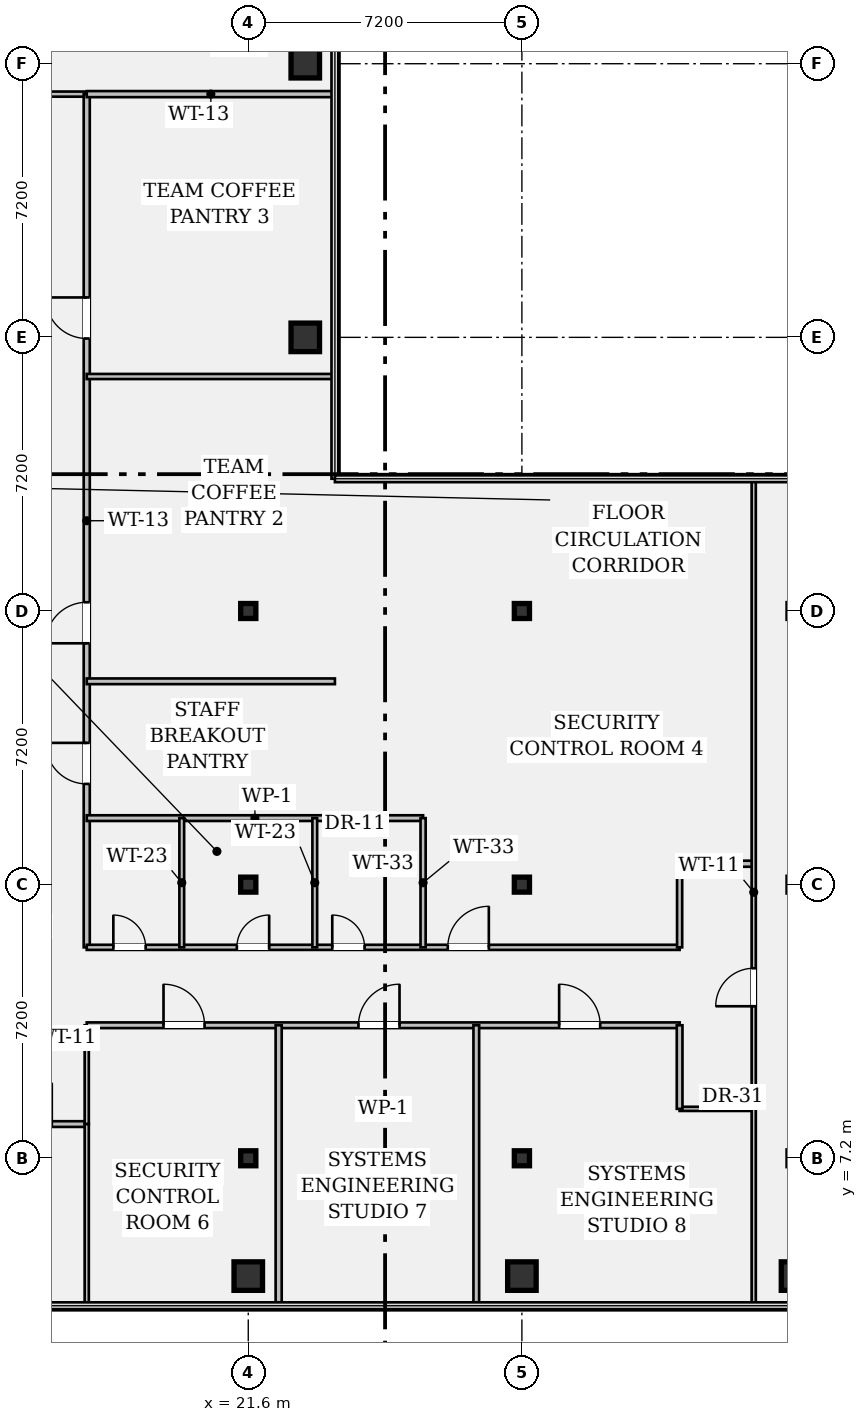
"""IFC4 building model, lengths in metres.
Left out: names, types, materials, properties, quantities, classifications, styles, units other than length and angle.
Written with IfcOpenShell. Run it as: python <this file> out.ifc"""

import sys

from ifc_helpers import new_model, si_unit, direction, frame, frame_2d, origin, origin_2d, place, context, subcontext, project, spatial, rectangle, hollow_rectangle, i_section, extrude, element, fill, save


model = new_model("IFC4")
c1 = context("Model", 3, precision=1e-05, world=origin(), true_north=direction((0.0, 1.0)))
c2 = subcontext(c1, "Body", "Model", "MODEL_VIEW")
j1 = project(units=[si_unit("LENGTHUNIT", "METRE"), si_unit("PLANEANGLEUNIT", "RADIAN")], contexts=[c1])
p1 = place(None, origin())
s1 = spatial("IfcSite", under=j1, at=p1, CompositionType="ELEMENT")
p2 = place(p1, origin())
s2 = spatial("IfcBuilding", under=s1, at=p2, CompositionType="ELEMENT")
p3 = place(p2, frame((0.0, 0.0, 222.25)))
s3 = spatial("IfcBuildingStorey", under=s2, at=p3, CompositionType="ELEMENT", Elevation=222.25)
p4 = place(p3, frame((21.6, 4.1, 0.0), z_axis=(0.0, 0.0, 1.0), x_axis=(1.0, 0.0, 0.0)))
e1 = element("IfcColumn", 1, at=p4, inside=s3, PredefinedType="COLUMN", context=c2, shape_type="SweptSolid", body=[
    extrude(hollow_rectangle(XDim=0.75, YDim=0.75, WallThickness=0.045, at=origin_2d()), origin(), (0.0, 0.0, 1.0), 3.24),
])
for number, where, z_axis, x_axis in (
    (2, (21.6, 7.2, 0.0), (0.0, 0.0, 1.0), (1.0, 0.0, 0.0)),
    (3, (21.6, 14.4, 0.0), (0.0, 0.0, 1.0), (1.0, 0.0, 0.0)),
    (4, (21.6, 21.6, 0.0), (0.0, 0.0, 1.0), (1.0, 0.0, 0.0)),
):
    element("IfcColumn", number, at=place(p3, frame(where, z_axis=z_axis, x_axis=x_axis)), inside=s3, PredefinedType="COLUMN", context=c2, shape_type="SweptSolid", body=[
        extrude(i_section(OverallWidth=0.399, OverallDepth=0.394, WebThickness=0.023, FlangeThickness=0.037, FilletRadius=0.018, at=origin_2d()), origin(), (0.0, 0.0, 1.0), 3.24),
    ])
for number, where, z_axis, x_axis in (
    (5, (23.1, 28.8, 0.0), (0.0, 0.0, 1.0), (1.0, 0.0, 0.0)),
    (6, (23.1, 36.0, 0.0), (0.0, 0.0, 1.0), (1.0, 0.0, 0.0)),
    (7, (28.8, 4.1, 0.0), (0.0, 0.0, 1.0), (1.0, 0.0, 0.0)),
):
    element("IfcColumn", number, at=place(p3, frame(where, z_axis=z_axis, x_axis=x_axis)), inside=s3, PredefinedType="COLUMN", context=c2, shape_type="SweptSolid", body=[
        extrude(hollow_rectangle(XDim=0.75, YDim=0.75, WallThickness=0.045, at=origin_2d()), origin(), (0.0, 0.0, 1.0), 3.24),
    ])
for number, where, z_axis, x_axis in (
    (8, (28.8, 7.2, 0.0), (0.0, 0.0, 1.0), (1.0, 0.0, 0.0)),
    (9, (28.8, 14.4, 0.0), (0.0, 0.0, 1.0), (1.0, 0.0, 0.0)),
    (10, (28.8, 21.6, 0.0), (0.0, 0.0, 1.0), (1.0, 0.0, 0.0)),
):
    element("IfcColumn", number, at=place(p3, frame(where, z_axis=z_axis, x_axis=x_axis)), inside=s3, PredefinedType="COLUMN", context=c2, shape_type="SweptSolid", body=[
        extrude(i_section(OverallWidth=0.399, OverallDepth=0.394, WebThickness=0.023, FlangeThickness=0.037, FilletRadius=0.018, at=origin_2d()), origin(), (0.0, 0.0, 1.0), 3.24),
    ])
p5 = place(p3, frame((36.0, 4.1, 0.0), z_axis=(0.0, 0.0, 1.0), x_axis=(1.0, 0.0, 0.0)))
e11 = element("IfcColumn", 11, at=p5, inside=s3, PredefinedType="COLUMN", context=c2, shape_type="SweptSolid", body=[
    extrude(hollow_rectangle(XDim=0.75, YDim=0.75, WallThickness=0.045, at=origin_2d()), origin(), (0.0, 0.0, 1.0), 3.24),
])
p6 = place(p3, frame((14.4, 8.1, 0.0), z_axis=(0.0, 0.0, 1.0), x_axis=(1.0, 0.0, 0.0)))
e12 = element("IfcWall", 12, at=p6, inside=s3, PredefinedType="PARTITIONING", context=c2, shape_type="SweptSolid", body=[
    extrude(rectangle(XDim=2.95, YDim=0.15, at=frame_2d((1.475, 0.0))), origin(), (0.0, 0.0, 1.0), 2.808),
])
p7 = place(p6, frame((0.95, 0.0, 0.0)))
e13 = element("IfcOpeningElement", 13, at=p7, cuts=e12, PredefinedType="OPENING", context=c2, shape_type="SweptSolid", body=[
    extrude(rectangle(XDim=1.08, YDim=2.15, at=frame_2d((0.54, 1.075))), frame((0.0, 0.087, 0.0), z_axis=(0.0, -1.0, 0.0), x_axis=(1.0, 0.0, 0.0)), (0.0, 0.0, 1.0), 0.174),
])
p8 = place(p3, frame((14.4, 35.2, 0.0), z_axis=(0.0, 0.0, 1.0), x_axis=(1.0, 0.0, 0.0)))
e14 = element("IfcWall", 14, at=p8, inside=s3, PredefinedType="PARTITIONING", context=c2, shape_type="SweptSolid", body=[
    extrude(rectangle(XDim=2.95, YDim=0.135, at=frame_2d((1.475, 0.0))), origin(), (0.0, 0.0, 1.0), 2.808),
])
p9 = place(p8, frame((0.95, 0.0, 0.0)))
e15 = element("IfcOpeningElement", 15, at=p9, cuts=e14, PredefinedType="OPENING", context=c2, shape_type="SweptSolid", body=[
    extrude(rectangle(XDim=1.0, YDim=2.15, at=frame_2d((0.5, 1.075))), frame((0.0, 0.08, 0.0), z_axis=(0.0, -1.0, 0.0), x_axis=(1.0, 0.0, 0.0)), (0.0, 0.0, 1.0), 0.159),
])
p10 = place(p3, frame((17.35, 8.1, 0.0), z_axis=(0.0, 0.0, 1.0), x_axis=(0.0, 1.0, 0.0)))
e16 = element("IfcWall", 16, at=p10, inside=s3, PredefinedType="PARTITIONING", context=c2, shape_type="SweptSolid", body=[
    extrude(rectangle(XDim=2.6, YDim=0.11, at=frame_2d((1.3, 0.0))), origin(), (0.0, 0.0, 1.0), 3.24),
])
p11 = place(p3, frame((17.35, 12.75, 0.0), z_axis=(0.0, 0.0, 1.0), x_axis=(0.0, 1.0, 0.0)))
e17 = element("IfcWall", 17, at=p11, inside=s3, PredefinedType="PARTITIONING", context=c2, shape_type="SweptSolid", body=[
    extrude(rectangle(XDim=22.45, YDim=0.16, at=frame_2d((11.225, 0.0))), origin(), (0.0, 0.0, 1.0), 2.613),
])
p12 = place(p11, frame((4.3, 0.0, 0.0)))
e18 = element("IfcOpeningElement", 18, at=p12, cuts=e17, PredefinedType="OPENING", context=c2, shape_type="SweptSolid", body=[
    extrude(rectangle(XDim=1.08, YDim=2.15, at=frame_2d((0.54, 1.075))), frame((0.0, 0.092, 0.0), z_axis=(0.0, -1.0, 0.0), x_axis=(1.0, 0.0, 0.0)), (0.0, 0.0, 1.0), 0.184),
])
p13 = place(p11, frame((8.0, 0.0, 0.0)))
e19 = element("IfcOpeningElement", 19, at=p13, cuts=e17, PredefinedType="OPENING", context=c2, shape_type="SweptSolid", body=[
    extrude(rectangle(XDim=1.08, YDim=2.15, at=frame_2d((0.54, 1.075))), frame((0.0, 0.092, 0.0), z_axis=(0.0, -1.0, 0.0), x_axis=(1.0, 0.0, 0.0)), (0.0, 0.0, 1.0), 0.184),
])
p14 = place(p11, frame((16.02, 0.0, 0.0)))
e20 = element("IfcOpeningElement", 20, at=p14, cuts=e17, PredefinedType="OPENING", context=c2, shape_type="SweptSolid", body=[
    extrude(rectangle(XDim=1.08, YDim=2.15, at=frame_2d((0.54, 1.075))), frame((0.0, 0.092, 0.0), z_axis=(0.0, -1.0, 0.0), x_axis=(1.0, 0.0, 0.0)), (0.0, 0.0, 1.0), 0.184),
])
p15 = place(p3, frame((17.35, 10.7, 0.0), z_axis=(0.0, 0.0, 1.0), x_axis=(1.0, 0.0, 0.0)))
e21 = element("IfcWall", 21, at=p15, inside=s3, PredefinedType="PARTITIONING", context=c2, shape_type="SweptSolid", body=[
    extrude(rectangle(XDim=15.6, YDim=0.15, at=frame_2d((7.8, 0.0))), origin(), (0.0, 0.0, 1.0), 2.613),
])
p16 = place(p15, frame((2.02, 0.0, 0.0)))
e22 = element("IfcOpeningElement", 22, at=p16, cuts=e21, PredefinedType="OPENING", context=c2, shape_type="SweptSolid", body=[
    extrude(rectangle(XDim=1.08, YDim=2.15, at=frame_2d((0.54, 1.075))), frame((0.0, 0.087, 0.0), z_axis=(0.0, -1.0, 0.0), x_axis=(1.0, 0.0, 0.0)), (0.0, 0.0, 1.0), 0.174),
])
p17 = place(p15, frame((7.15, 0.0, 0.0)))
e23 = element("IfcOpeningElement", 23, at=p17, cuts=e21, PredefinedType="OPENING", context=c2, shape_type="SweptSolid", body=[
    extrude(rectangle(XDim=1.08, YDim=2.15, at=frame_2d((0.54, 1.075))), frame((0.0, 0.087, 0.0), z_axis=(0.0, -1.0, 0.0), x_axis=(1.0, 0.0, 0.0)), (0.0, 0.0, 1.0), 0.174),
])
p18 = place(p15, frame((12.43, 0.0, 0.0)))
e24 = element("IfcOpeningElement", 24, at=p18, cuts=e21, PredefinedType="OPENING", context=c2, shape_type="SweptSolid", body=[
    extrude(rectangle(XDim=1.08, YDim=2.15, at=frame_2d((0.54, 1.075))), frame((0.0, 0.087, 0.0), z_axis=(0.0, -1.0, 0.0), x_axis=(1.0, 0.0, 0.0)), (0.0, 0.0, 1.0), 0.174),
])
p19 = place(p3, frame((17.35, 12.75, 0.0), z_axis=(0.0, 0.0, 1.0), x_axis=(1.0, 0.0, 0.0)))
e25 = element("IfcWall", 25, at=p19, inside=s3, PredefinedType="PARTITIONING", context=c2, shape_type="SweptSolid", body=[
    extrude(rectangle(XDim=15.6, YDim=0.135, at=frame_2d((7.8, 0.0))), origin(), (0.0, 0.0, 1.0), 2.613),
])
p20 = place(p19, frame((0.7, 0.0, 0.0)))
e26 = element("IfcOpeningElement", 26, at=p20, cuts=e25, PredefinedType="OPENING", context=c2, shape_type="SweptSolid", body=[
    extrude(rectangle(XDim=0.85, YDim=2.15, at=frame_2d((0.425, 1.075))), frame((0.0, 0.08, 0.0), z_axis=(0.0, -1.0, 0.0), x_axis=(1.0, 0.0, 0.0)), (0.0, 0.0, 1.0), 0.159),
])
p21 = place(p19, frame((3.95, 0.0, 0.0)))
e27 = element("IfcOpeningElement", 27, at=p21, cuts=e25, PredefinedType="OPENING", context=c2, shape_type="SweptSolid", body=[
    extrude(rectangle(XDim=0.85, YDim=2.15, at=frame_2d((0.425, 1.075))), frame((0.0, 0.08, 0.0), z_axis=(0.0, -1.0, 0.0), x_axis=(1.0, 0.0, 0.0)), (0.0, 0.0, 1.0), 0.159),
])
p22 = place(p19, frame((6.46, 0.0, 0.0)))
e28 = element("IfcOpeningElement", 28, at=p22, cuts=e25, PredefinedType="OPENING", context=c2, shape_type="SweptSolid", body=[
    extrude(rectangle(XDim=0.85, YDim=2.15, at=frame_2d((0.425, 1.075))), frame((0.0, 0.08, 0.0), z_axis=(0.0, -1.0, 0.0), x_axis=(1.0, 0.0, 0.0)), (0.0, 0.0, 1.0), 0.159),
])
p23 = place(p19, frame((9.5, 0.0, 0.0)))
e29 = element("IfcOpeningElement", 29, at=p23, cuts=e25, PredefinedType="OPENING", context=c2, shape_type="SweptSolid", body=[
    extrude(rectangle(XDim=1.08, YDim=2.15, at=frame_2d((0.54, 1.075))), frame((0.0, 0.08, 0.0), z_axis=(0.0, -1.0, 0.0), x_axis=(1.0, 0.0, 0.0)), (0.0, 0.0, 1.0), 0.159),
])
p24 = place(p3, frame((32.95, 8.5, 0.0), z_axis=(0.0, 0.0, 1.0), x_axis=(1.0, 0.0, 0.0)))
e30 = element("IfcWall", 30, at=p24, inside=s3, PredefinedType="PARTITIONING", context=c2, shape_type="SweptSolid", body=[
    extrude(rectangle(XDim=1.95, YDim=0.11, at=frame_2d((0.975, 0.0))), origin(), (0.0, 0.0, 1.0), 2.808),
])
p25 = place(p3, frame((32.95, 14.95, 0.0), z_axis=(0.0, 0.0, 1.0), x_axis=(1.0, 0.0, 0.0)))
e31 = element("IfcWall", 31, at=p25, inside=s3, PredefinedType="PARTITIONING", context=c2, shape_type="SweptSolid", body=[
    extrude(rectangle(XDim=1.95, YDim=0.16, at=frame_2d((0.975, 0.0))), origin(), (0.0, 0.0, 1.0), 2.808),
])
p26 = place(p3, frame((32.95, 8.5, 0.0), z_axis=(0.0, 0.0, 1.0), x_axis=(0.0, 1.0, 0.0)))
e32 = element("IfcWall", 32, at=p26, inside=s3, PredefinedType="PARTITIONING", context=c2, shape_type="SweptSolid", body=[
    extrude(rectangle(XDim=2.2, YDim=0.15, at=frame_2d((1.1, 0.0))), origin(), (0.0, 0.0, 1.0), 3.24),
])
p27 = place(p3, frame((32.95, 12.75, 0.0), z_axis=(0.0, 0.0, 1.0), x_axis=(0.0, 1.0, 0.0)))
e33 = element("IfcWall", 33, at=p27, inside=s3, PredefinedType="PARTITIONING", context=c2, shape_type="SweptSolid", body=[
    extrude(rectangle(XDim=2.2, YDim=0.135, at=frame_2d((1.1, 0.0))), origin(), (0.0, 0.0, 1.0), 2.613),
])
p28 = place(p3, frame((34.9, 3.32, 0.0), z_axis=(0.0, 0.0, 1.0), x_axis=(0.0, 1.0, 0.0)))
e34 = element("IfcWall", 34, at=p28, inside=s3, PredefinedType="PARTITIONING", context=c2, shape_type="SweptSolid", body=[
    extrude(rectangle(XDim=21.76, YDim=0.11, at=frame_2d((10.88, 0.0))), origin(), (0.0, 0.0, 1.0), 2.613),
])
p29 = place(p28, frame((7.88, 0.0, 0.0)))
e35 = element("IfcOpeningElement", 35, at=p29, cuts=e34, PredefinedType="OPENING", context=c2, shape_type="SweptSolid", body=[
    extrude(rectangle(XDim=1.0, YDim=2.15, at=frame_2d((0.5, 1.075))), frame((0.0, 0.067, 0.0), z_axis=(0.0, -1.0, 0.0), x_axis=(1.0, 0.0, 0.0)), (0.0, 0.0, 1.0), 0.134),
])
p30 = place(p3, frame((17.35, 35.2, 0.0), z_axis=(0.0, 0.0, 1.0), x_axis=(1.0, 0.0, 0.0)))
e36 = element("IfcWall", 36, at=p30, inside=s3, PredefinedType="PARTITIONING", context=c2, shape_type="SweptSolid", body=[
    extrude(rectangle(XDim=6.53, YDim=0.16, at=frame_2d((3.265, 0.0))), origin(), (0.0, 0.0, 1.0), 2.808),
])
p31 = place(p3, frame((17.35, 16.15, 0.0), z_axis=(0.0, 0.0, 1.0), x_axis=(1.0, 0.0, 0.0)))
e37 = element("IfcWall", 37, at=p31, inside=s3, PredefinedType="PARTITIONING", context=c2, shape_type="SweptSolid", body=[
    extrude(rectangle(XDim=8.85, YDim=0.15, at=frame_2d((4.425, 0.0))), origin(), (0.0, 0.0, 1.0), 2.613),
])
p32 = place(p3, frame((26.2, 12.75, 0.0), z_axis=(0.0, 0.0, 1.0), x_axis=(0.0, 1.0, 0.0)))
e38 = element("IfcWall", 38, at=p32, inside=s3, PredefinedType="PARTITIONING", context=c2, shape_type="SweptSolid", body=[
    extrude(rectangle(XDim=3.4, YDim=0.135, at=frame_2d((1.7, 0.0))), origin(), (0.0, 0.0, 1.0), 2.613),
])
for number, where, z_axis, x_axis in (
    (39, (19.85, 12.75, 0.0), (0.0, 0.0, 1.0), (0.0, 1.0, 0.0)),
    (40, (23.35, 12.75, 0.0), (0.0, 0.0, 1.0), (0.0, 1.0, 0.0)),
):
    element("IfcWall", number, at=place(p3, frame(where, z_axis=z_axis, x_axis=x_axis)), inside=s3, PredefinedType="PARTITIONING", context=c2, shape_type="SweptSolid", body=[
        extrude(rectangle(XDim=3.4, YDim=0.125, at=frame_2d((1.7, 0.0))), origin(), (0.0, 0.0, 1.0), 2.613),
    ])
p33 = place(p3, frame((17.35, 19.75, 0.0), z_axis=(0.0, 0.0, 1.0), x_axis=(1.0, 0.0, 0.0)))
e41 = element("IfcWall", 41, at=p33, inside=s3, PredefinedType="PARTITIONING", context=c2, shape_type="SweptSolid", body=[
    extrude(rectangle(XDim=6.53, YDim=0.15, at=frame_2d((3.265, 0.0))), origin(), (0.0, 0.0, 1.0), 2.613),
])
p34 = place(p3, frame((17.35, 27.77, 0.0), z_axis=(0.0, 0.0, 1.0), x_axis=(1.0, 0.0, 0.0)))
e42 = element("IfcWall", 42, at=p34, inside=s3, PredefinedType="PARTITIONING", context=c2, shape_type="SweptSolid", body=[
    extrude(rectangle(XDim=6.53, YDim=0.135, at=frame_2d((3.265, 0.0))), origin(), (0.0, 0.0, 1.0), 2.808),
])
p35 = place(p3, frame((17.35, 3.32, 0.0), z_axis=(0.0, 0.0, 1.0), x_axis=(0.0, 1.0, 0.0)))
e43 = element("IfcWall", 43, at=p35, inside=s3, PredefinedType="PARTITIONING", context=c2, shape_type="SweptSolid", body=[
    extrude(rectangle(XDim=4.78, YDim=0.11, at=frame_2d((2.39, 0.0))), origin(), (0.0, 0.0, 1.0), 2.613),
])
p36 = place(p3, frame((22.4, 3.32, 0.0), z_axis=(0.0, 0.0, 1.0), x_axis=(0.0, 1.0, 0.0)))
e44 = element("IfcWall", 44, at=p36, inside=s3, PredefinedType="PARTITIONING", context=c2, shape_type="SweptSolid", body=[
    extrude(rectangle(XDim=7.38, YDim=0.16, at=frame_2d((3.69, 0.0))), origin(), (0.0, 0.0, 1.0), 2.613),
])
p37 = place(p3, frame((27.6, 3.32, 0.0), z_axis=(0.0, 0.0, 1.0), x_axis=(0.0, 1.0, 0.0)))
e45 = element("IfcWall", 45, at=p37, inside=s3, PredefinedType="PARTITIONING", context=c2, shape_type="SweptSolid", body=[
    extrude(rectangle(XDim=7.38, YDim=0.15, at=frame_2d((3.69, 0.0))), origin(), (0.0, 0.0, 1.0), 2.613),
])
p38 = place(p20, origin())
e46 = element("IfcDoor", 46, at=p38, inside=s3, OperationType="SINGLE_SWING_LEFT", PredefinedType="DOOR", context=c2, shape_type="SweptSolid", body=[
    extrude(rectangle(XDim=0.85, YDim=2.15, at=frame_2d((0.425, 1.075))), frame((0.0, 0.025, 0.0), z_axis=(0.0, -1.0, 0.0), x_axis=(1.0, 0.0, 0.0)), (0.0, 0.0, 1.0), 0.05),
])
fill(e26, e46)
p39 = place(p21, origin())
e47 = element("IfcDoor", 47, at=p39, inside=s3, OperationType="SINGLE_SWING_RIGHT", PredefinedType="DOOR", context=c2, shape_type="SweptSolid", body=[
    extrude(rectangle(XDim=0.85, YDim=2.15, at=frame_2d((0.425, 1.075))), frame((0.0, 0.025, 0.0), z_axis=(0.0, -1.0, 0.0), x_axis=(1.0, 0.0, 0.0)), (0.0, 0.0, 1.0), 0.05),
])
fill(e27, e47)
p40 = place(p22, origin())
e48 = element("IfcDoor", 48, at=p40, inside=s3, OperationType="SINGLE_SWING_LEFT", PredefinedType="DOOR", context=c2, shape_type="SweptSolid", body=[
    extrude(rectangle(XDim=0.85, YDim=2.15, at=frame_2d((0.425, 1.075))), frame((0.0, 0.025, 0.0), z_axis=(0.0, -1.0, 0.0), x_axis=(1.0, 0.0, 0.0)), (0.0, 0.0, 1.0), 0.05),
])
fill(e28, e48)
p41 = place(p12, origin())
e49 = element("IfcDoor", 49, at=p41, inside=s3, OperationType="SINGLE_SWING_RIGHT", PredefinedType="DOOR", context=c2, shape_type="SweptSolid", body=[
    extrude(rectangle(XDim=1.08, YDim=2.15, at=frame_2d((0.54, 1.075))), frame((0.0, 0.025, 0.0), z_axis=(0.0, -1.0, 0.0), x_axis=(1.0, 0.0, 0.0)), (0.0, 0.0, 1.0), 0.05),
])
fill(e18, e49)
p42 = place(p13, origin())
e50 = element("IfcDoor", 50, at=p42, inside=s3, OperationType="SINGLE_SWING_LEFT", PredefinedType="DOOR", context=c2, shape_type="SweptSolid", body=[
    extrude(rectangle(XDim=1.08, YDim=2.15, at=frame_2d((0.54, 1.075))), frame((0.0, 0.025, 0.0), z_axis=(0.0, -1.0, 0.0), x_axis=(1.0, 0.0, 0.0)), (0.0, 0.0, 1.0), 0.05),
])
fill(e19, e50)
p43 = place(p14, origin())
e51 = element("IfcDoor", 51, at=p43, inside=s3, OperationType="SINGLE_SWING_RIGHT", PredefinedType="DOOR", context=c2, shape_type="SweptSolid", body=[
    extrude(rectangle(XDim=1.08, YDim=2.15, at=frame_2d((0.54, 1.075))), frame((0.0, 0.025, 0.0), z_axis=(0.0, -1.0, 0.0), x_axis=(1.0, 0.0, 0.0)), (0.0, 0.0, 1.0), 0.05),
])
fill(e20, e51)
p44 = place(p23, origin())
e52 = element("IfcDoor", 52, at=p44, inside=s3, OperationType="SINGLE_SWING_RIGHT", PredefinedType="DOOR", context=c2, shape_type="SweptSolid", body=[
    extrude(rectangle(XDim=1.08, YDim=2.15, at=frame_2d((0.54, 1.075))), frame((0.0, 0.025, 0.0), z_axis=(0.0, -1.0, 0.0), x_axis=(1.0, 0.0, 0.0)), (0.0, 0.0, 1.0), 0.05),
])
fill(e29, e52)
p45 = place(p16, origin())
e53 = element("IfcDoor", 53, at=p45, inside=s3, OperationType="SINGLE_SWING_LEFT", PredefinedType="DOOR", context=c2, shape_type="SweptSolid", body=[
    extrude(rectangle(XDim=1.08, YDim=2.15, at=frame_2d((0.54, 1.075))), frame((0.0, 0.025, 0.0), z_axis=(0.0, -1.0, 0.0), x_axis=(1.0, 0.0, 0.0)), (0.0, 0.0, 1.0), 0.05),
])
fill(e22, e53)
p46 = place(p17, origin())
e54 = element("IfcDoor", 54, at=p46, inside=s3, OperationType="SINGLE_SWING_RIGHT", PredefinedType="DOOR", context=c2, shape_type="SweptSolid", body=[
    extrude(rectangle(XDim=1.08, YDim=2.15, at=frame_2d((0.54, 1.075))), frame((0.0, 0.025, 0.0), z_axis=(0.0, -1.0, 0.0), x_axis=(1.0, 0.0, 0.0)), (0.0, 0.0, 1.0), 0.05),
])
fill(e23, e54)
p47 = place(p18, origin())
e55 = element("IfcDoor", 55, at=p47, inside=s3, OperationType="SINGLE_SWING_LEFT", PredefinedType="DOOR", context=c2, shape_type="SweptSolid", body=[
    extrude(rectangle(XDim=1.08, YDim=2.15, at=frame_2d((0.54, 1.075))), frame((0.0, 0.025, 0.0), z_axis=(0.0, -1.0, 0.0), x_axis=(1.0, 0.0, 0.0)), (0.0, 0.0, 1.0), 0.05),
])
fill(e24, e55)
p48 = place(p29, origin())
e56 = element("IfcDoor", 56, at=p48, inside=s3, OperationType="SINGLE_SWING_LEFT", PredefinedType="DOOR", context=c2, shape_type="SweptSolid", body=[
    extrude(rectangle(XDim=1.0, YDim=2.15, at=frame_2d((0.5, 1.075))), frame((0.0, 0.025, 0.0), z_axis=(0.0, -1.0, 0.0), x_axis=(1.0, 0.0, 0.0)), (0.0, 0.0, 1.0), 0.05),
])
fill(e35, e56)
save(model, sys.argv[1])
